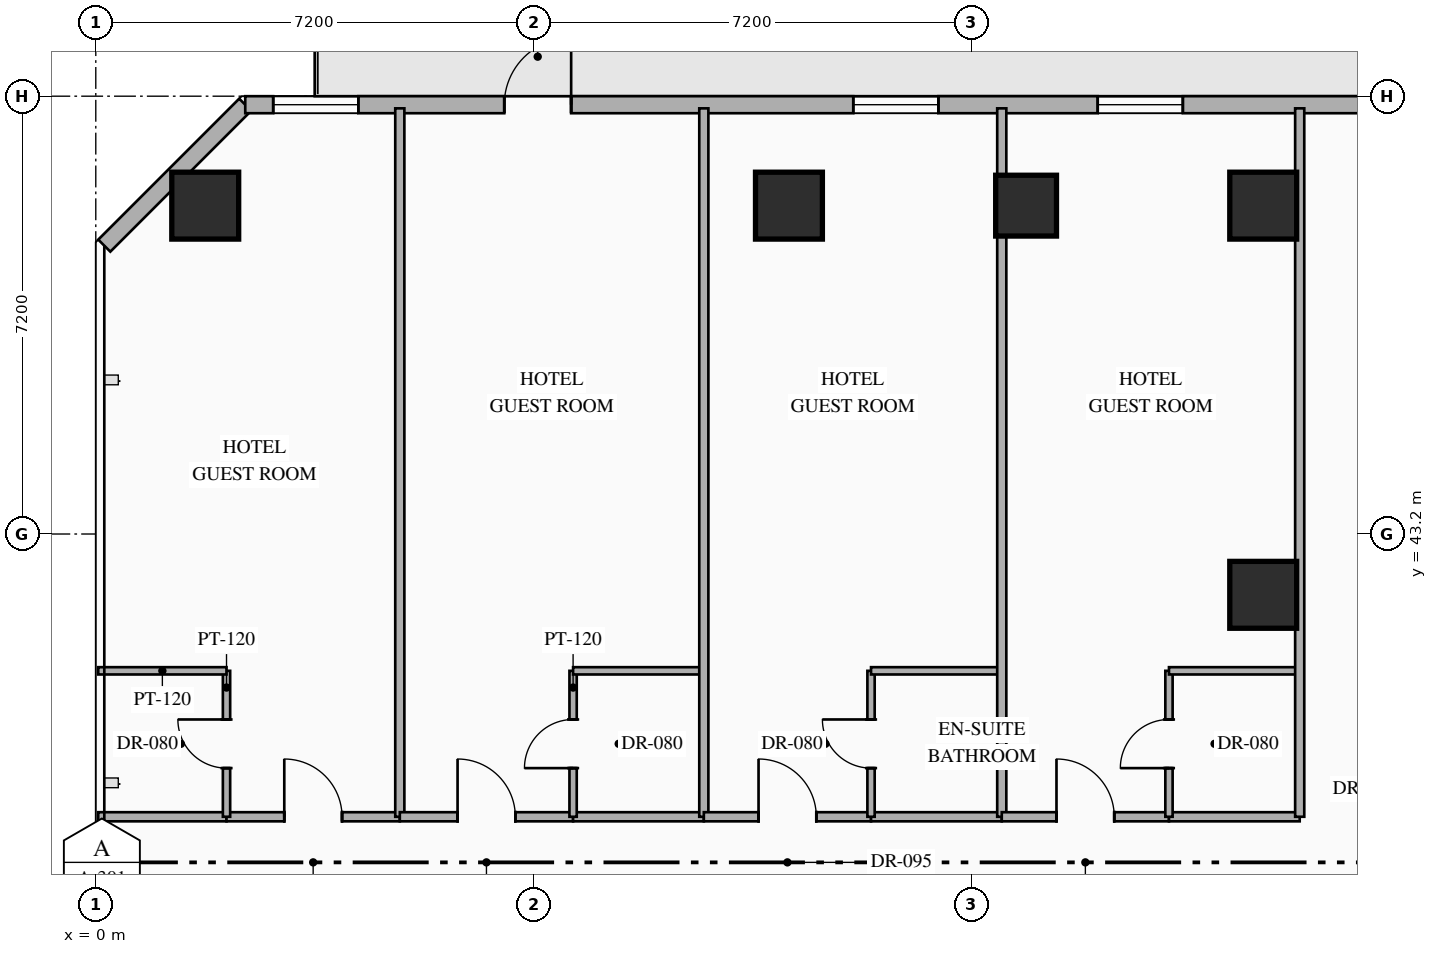
"""IFC4 building model, lengths in metres.
Left out: names, types, materials, properties, quantities, classifications, styles, units other than length and angle.
Written with IfcOpenShell. Run it as: python <this file> out.ifc"""

import sys

from ifc_helpers import new_model, si_unit, direction, frame, frame_2d, origin, origin_2d, place, context, subcontext, project, spatial, rectangle, hollow_rectangle, extrude, element, fill, save


model = new_model("IFC4")
c1 = context("Model", 3, precision=1e-05, world=origin(), true_north=direction((0.0, 1.0)))
c2 = subcontext(c1, "Body", "Model", "MODEL_VIEW")
j1 = project(units=[si_unit("LENGTHUNIT", "METRE"), si_unit("PLANEANGLEUNIT", "RADIAN")], contexts=[c1])
p1 = place(None, origin())
s1 = spatial("IfcSite", under=j1, at=p1, CompositionType="ELEMENT")
p2 = place(p1, origin())
s2 = spatial("IfcBuilding", under=s1, at=p2, CompositionType="ELEMENT")
p3 = place(p2, frame((0.0, 0.0, 60.05)))
s3 = spatial("IfcBuildingStorey", under=s2, at=p3, CompositionType="ELEMENT", Elevation=60.05)
for number, where, z_axis, x_axis in (
    (1, (1.8, 48.6, 0.0), (0.0, 0.0, 1.0), (1.0, 0.0, 0.0)),
    (2, (11.4, 48.6, 0.0), (0.0, 0.0, 1.0), (1.0, 0.0, 0.0)),
    (3, (19.2, 48.6, 0.0), (0.0, 0.0, 1.0), (1.0, 0.0, 0.0)),
    (4, (19.2, 42.2, 0.0), (0.0, 0.0, 1.0), (1.0, 0.0, 0.0)),
):
    element("IfcColumn", number, at=place(p3, frame(where, z_axis=z_axis, x_axis=x_axis)), inside=s3, PredefinedType="COLUMN", context=c2, shape_type="SweptSolid", body=[
        extrude(hollow_rectangle(XDim=1.1, YDim=1.1, WallThickness=0.04, at=origin_2d()), origin(), (0.0, 0.0, 1.0), 3.35),
    ])
p4 = place(p3, frame((15.3, 48.6, 0.0), z_axis=(0.0, 0.0, 1.0), x_axis=(1.0, 0.0, 0.0)))
e5 = element("IfcColumn", 5, at=p4, inside=s3, PredefinedType="COLUMN", context=c2, shape_type="SweptSolid", body=[
    extrude(hollow_rectangle(XDim=1.0, YDim=1.0, WallThickness=0.038, at=origin_2d()), origin(), (0.0, 0.0, 1.0), 3.35),
])
p5 = place(p3, frame((0.14, 47.942, 0.0), z_axis=(0.0, 0.0, 1.0), x_axis=(0.707106781187, 0.707106781187, 0.0)))
e6 = element("IfcWall", 6, at=p5, inside=s3, PredefinedType="STANDARD", context=c2, shape_type="SweptSolid", body=[
    extrude(rectangle(XDim=3.278, YDim=0.28, at=frame_2d((1.639, 0.0))), origin(), (0.0, 0.0, 1.0), 3.13),
])
p6 = place(p3, frame((2.458, 50.26, 0.0), z_axis=(0.0, 0.0, 1.0), x_axis=(1.0, 0.0, 0.0)))
e7 = element("IfcWall", 7, at=p6, inside=s3, PredefinedType="STANDARD", context=c2, shape_type="SweptSolid", body=[
    extrude(rectangle(XDim=40.084, YDim=0.28, at=frame_2d((20.042, 0.0))), origin(), (0.0, 0.0, 1.0), 3.13),
])
p7 = place(p6, frame((4.26, 0.0, 0.0)))
e8 = element("IfcOpeningElement", 8, at=p7, cuts=e7, PredefinedType="OPENING", context=c2, shape_type="SweptSolid", body=[
    extrude(rectangle(XDim=1.1, YDim=2.2, at=frame_2d((0.55, 1.1))), frame((0.0, 0.15, 0.0), z_axis=(0.0, -1.0, 0.0), x_axis=(1.0, 0.0, 0.0)), (0.0, 0.0, 1.0), 0.3),
])
p8 = place(p6, frame((0.46, 0.0, 0.85)))
e9 = element("IfcOpeningElement", 9, at=p8, cuts=e7, PredefinedType="OPENING", context=c2, shape_type="SweptSolid", body=[
    extrude(rectangle(XDim=1.4, YDim=1.8, at=frame_2d((0.7, 0.9))), frame((0.0, 0.15, 0.0), z_axis=(0.0, -1.0, 0.0), x_axis=(1.0, 0.0, 0.0)), (0.0, 0.0, 1.0), 0.3),
])
p9 = place(p6, frame((10.0, 0.0, 0.85)))
e10 = element("IfcOpeningElement", 10, at=p9, cuts=e7, PredefinedType="OPENING", context=c2, shape_type="SweptSolid", body=[
    extrude(rectangle(XDim=1.4, YDim=1.8, at=frame_2d((0.7, 0.9))), frame((0.0, 0.15, 0.0), z_axis=(0.0, -1.0, 0.0), x_axis=(1.0, 0.0, 0.0)), (0.0, 0.0, 1.0), 0.3),
])
p10 = place(p6, frame((14.02, 0.0, 0.85)))
e11 = element("IfcOpeningElement", 11, at=p10, cuts=e7, PredefinedType="OPENING", context=c2, shape_type="SweptSolid", body=[
    extrude(rectangle(XDim=1.4, YDim=1.8, at=frame_2d((0.7, 0.9))), frame((0.0, 0.15, 0.0), z_axis=(0.0, -1.0, 0.0), x_axis=(1.0, 0.0, 0.0)), (0.0, 0.0, 1.0), 0.3),
])
p11 = place(p6, frame((20.789, 0.0, 0.85)))
e12 = element("IfcOpeningElement", 12, at=p11, cuts=e7, PredefinedType="OPENING", context=c2, shape_type="SweptSolid", body=[
    extrude(rectangle(XDim=1.4, YDim=1.8, at=frame_2d((0.7, 0.9))), frame((0.0, 0.15, 0.0), z_axis=(0.0, -1.0, 0.0), x_axis=(1.0, 0.0, 0.0)), (0.0, 0.0, 1.0), 0.3),
])
p12 = place(p6, frame((24.664, 0.0, 0.85)))
e13 = element("IfcOpeningElement", 13, at=p12, cuts=e7, PredefinedType="OPENING", context=c2, shape_type="SweptSolid", body=[
    extrude(rectangle(XDim=1.4, YDim=1.8, at=frame_2d((0.7, 0.9))), frame((0.0, 0.15, 0.0), z_axis=(0.0, -1.0, 0.0), x_axis=(1.0, 0.0, 0.0)), (0.0, 0.0, 1.0), 0.3),
])
p13 = place(p6, frame((26.803, 0.0, 0.85)))
e14 = element("IfcOpeningElement", 14, at=p13, cuts=e7, PredefinedType="OPENING", context=c2, shape_type="SweptSolid", body=[
    extrude(rectangle(XDim=1.4, YDim=1.8, at=frame_2d((0.7, 0.9))), frame((0.0, 0.15, 0.0), z_axis=(0.0, -1.0, 0.0), x_axis=(1.0, 0.0, 0.0)), (0.0, 0.0, 1.0), 0.3),
])
p14 = place(p6, frame((32.703, 0.0, 0.85)))
e15 = element("IfcOpeningElement", 15, at=p14, cuts=e7, PredefinedType="OPENING", context=c2, shape_type="SweptSolid", body=[
    extrude(rectangle(XDim=1.4, YDim=1.8, at=frame_2d((0.7, 0.9))), frame((0.0, 0.15, 0.0), z_axis=(0.0, -1.0, 0.0), x_axis=(1.0, 0.0, 0.0)), (0.0, 0.0, 1.0), 0.3),
])
p15 = place(p6, frame((36.967, 0.0, 0.85)))
e16 = element("IfcOpeningElement", 16, at=p15, cuts=e7, PredefinedType="OPENING", context=c2, shape_type="SweptSolid", body=[
    extrude(rectangle(XDim=1.4, YDim=1.8, at=frame_2d((0.7, 0.9))), frame((0.0, 0.15, 0.0), z_axis=(0.0, -1.0, 0.0), x_axis=(1.0, 0.0, 0.0)), (0.0, 0.0, 1.0), 0.3),
])
p16 = place(p3, frame((0.04, 38.55, 0.0), z_axis=(0.0, 0.0, 1.0), x_axis=(1.0, 0.0, 0.0)))
e17 = element("IfcWall", 17, at=p16, inside=s3, PredefinedType="PARTITIONING", context=c2, shape_type="SweptSolid", body=[
    extrude(rectangle(XDim=2.11, YDim=0.15, at=frame_2d((1.055, 0.0))), origin(), (0.0, 0.0, 1.0), 2.775),
])
p17 = place(p3, frame((2.15, 38.55, 0.0), z_axis=(0.0, 0.0, 1.0), x_axis=(1.0, 0.0, 0.0)))
e18 = element("IfcWall", 18, at=p17, inside=s3, PredefinedType="PARTITIONING", context=c2, shape_type="SweptSolid", body=[
    extrude(rectangle(XDim=2.85, YDim=0.15, at=frame_2d((1.425, 0.0))), origin(), (0.0, 0.0, 1.0), 2.775),
])
p18 = place(p17, frame((0.95, 0.0, 0.0)))
e19 = element("IfcOpeningElement", 19, at=p18, cuts=e18, PredefinedType="OPENING", context=c2, shape_type="SweptSolid", body=[
    extrude(rectangle(XDim=0.95, YDim=2.15, at=frame_2d((0.475, 1.075))), frame((0.0, 0.085, 0.0), z_axis=(0.0, -1.0, 0.0), x_axis=(1.0, 0.0, 0.0)), (0.0, 0.0, 1.0), 0.17),
])
p19 = place(p3, frame((2.15, 38.55, 0.0), z_axis=(0.0, 0.0, 1.0), x_axis=(0.0, 1.0, 0.0)))
e20 = element("IfcWall", 20, at=p19, inside=s3, PredefinedType="PARTITIONING", context=c2, shape_type="SweptSolid", body=[
    extrude(rectangle(XDim=2.4, YDim=0.12, at=frame_2d((1.2, 0.0))), origin(), (0.0, 0.0, 1.0), 3.13),
])
p20 = place(p19, frame((0.8, 0.0, 0.0)))
e21 = element("IfcOpeningElement", 21, at=p20, cuts=e20, PredefinedType="OPENING", context=c2, shape_type="SweptSolid", body=[
    extrude(rectangle(XDim=0.8, YDim=2.06, at=frame_2d((0.4, 1.03))), frame((0.0, 0.07, 0.0), z_axis=(0.0, -1.0, 0.0), x_axis=(1.0, 0.0, 0.0)), (0.0, 0.0, 1.0), 0.14),
])
p21 = place(p3, frame((0.04, 40.95, 0.0), z_axis=(0.0, 0.0, 1.0), x_axis=(1.0, 0.0, 0.0)))
e22 = element("IfcWall", 22, at=p21, inside=s3, PredefinedType="PARTITIONING", context=c2, shape_type="SweptSolid", body=[
    extrude(rectangle(XDim=2.11, YDim=0.12, at=frame_2d((1.055, 0.0))), origin(), (0.0, 0.0, 1.0), 2.775),
])
p22 = place(p3, frame((5.0, 38.55, 0.0), z_axis=(0.0, 0.0, 1.0), x_axis=(0.0, 1.0, 0.0)))
e23 = element("IfcWall", 23, at=p22, inside=s3, PredefinedType="PARTITIONING", context=c2, shape_type="SweptSolid", body=[
    extrude(rectangle(XDim=11.65, YDim=0.15, at=frame_2d((5.825, 0.0))), origin(), (0.0, 0.0, 1.0), 3.13),
])
p23 = place(p3, frame((5.0, 38.55, 0.0), z_axis=(0.0, 0.0, 1.0), x_axis=(1.0, 0.0, 0.0)))
e24 = element("IfcWall", 24, at=p23, inside=s3, PredefinedType="PARTITIONING", context=c2, shape_type="SweptSolid", body=[
    extrude(rectangle(XDim=2.85, YDim=0.15, at=frame_2d((1.425, 0.0))), origin(), (0.0, 0.0, 1.0), 2.775),
])
p24 = place(p23, frame((0.95, 0.0, 0.0)))
e25 = element("IfcOpeningElement", 25, at=p24, cuts=e24, PredefinedType="OPENING", context=c2, shape_type="SweptSolid", body=[
    extrude(rectangle(XDim=0.95, YDim=2.15, at=frame_2d((0.475, 1.075))), frame((0.0, 0.085, 0.0), z_axis=(0.0, -1.0, 0.0), x_axis=(1.0, 0.0, 0.0)), (0.0, 0.0, 1.0), 0.17),
])
p25 = place(p3, frame((7.85, 38.55, 0.0), z_axis=(0.0, 0.0, 1.0), x_axis=(1.0, 0.0, 0.0)))
e26 = element("IfcWall", 26, at=p25, inside=s3, PredefinedType="PARTITIONING", context=c2, shape_type="SweptSolid", body=[
    extrude(rectangle(XDim=2.15, YDim=0.15, at=frame_2d((1.075, 0.0))), origin(), (0.0, 0.0, 1.0), 2.775),
])
p26 = place(p3, frame((7.85, 38.55, 0.0), z_axis=(0.0, 0.0, 1.0), x_axis=(0.0, 1.0, 0.0)))
e27 = element("IfcWall", 27, at=p26, inside=s3, PredefinedType="PARTITIONING", context=c2, shape_type="SweptSolid", body=[
    extrude(rectangle(XDim=2.4, YDim=0.12, at=frame_2d((1.2, 0.0))), origin(), (0.0, 0.0, 1.0), 3.13),
])
p27 = place(p26, frame((0.8, 0.0, 0.0)))
e28 = element("IfcOpeningElement", 28, at=p27, cuts=e27, PredefinedType="OPENING", context=c2, shape_type="SweptSolid", body=[
    extrude(rectangle(XDim=0.8, YDim=2.06, at=frame_2d((0.4, 1.03))), frame((0.0, 0.07, 0.0), z_axis=(0.0, -1.0, 0.0), x_axis=(1.0, 0.0, 0.0)), (0.0, 0.0, 1.0), 0.14),
])
p28 = place(p3, frame((7.85, 40.95, 0.0), z_axis=(0.0, 0.0, 1.0), x_axis=(1.0, 0.0, 0.0)))
e29 = element("IfcWall", 29, at=p28, inside=s3, PredefinedType="PARTITIONING", context=c2, shape_type="SweptSolid", body=[
    extrude(rectangle(XDim=2.15, YDim=0.12, at=frame_2d((1.075, 0.0))), origin(), (0.0, 0.0, 1.0), 2.775),
])
p29 = place(p3, frame((10.0, 38.55, 0.0), z_axis=(0.0, 0.0, 1.0), x_axis=(0.0, 1.0, 0.0)))
e30 = element("IfcWall", 30, at=p29, inside=s3, PredefinedType="PARTITIONING", context=c2, shape_type="SweptSolid", body=[
    extrude(rectangle(XDim=11.65, YDim=0.15, at=frame_2d((5.825, 0.0))), origin(), (0.0, 0.0, 1.0), 3.13),
])
p30 = place(p3, frame((10.0, 38.55, 0.0), z_axis=(0.0, 0.0, 1.0), x_axis=(1.0, 0.0, 0.0)))
e31 = element("IfcWall", 31, at=p30, inside=s3, PredefinedType="PARTITIONING", context=c2, shape_type="SweptSolid", body=[
    extrude(rectangle(XDim=2.75, YDim=0.15, at=frame_2d((1.375, 0.0))), origin(), (0.0, 0.0, 1.0), 2.775),
])
p31 = place(p30, frame((0.9, 0.0, 0.0)))
e32 = element("IfcOpeningElement", 32, at=p31, cuts=e31, PredefinedType="OPENING", context=c2, shape_type="SweptSolid", body=[
    extrude(rectangle(XDim=0.95, YDim=2.15, at=frame_2d((0.475, 1.075))), frame((0.0, 0.085, 0.0), z_axis=(0.0, -1.0, 0.0), x_axis=(1.0, 0.0, 0.0)), (0.0, 0.0, 1.0), 0.17),
])
p32 = place(p3, frame((12.75, 38.55, 0.0), z_axis=(0.0, 0.0, 1.0), x_axis=(1.0, 0.0, 0.0)))
e33 = element("IfcWall", 33, at=p32, inside=s3, PredefinedType="PARTITIONING", context=c2, shape_type="SweptSolid", body=[
    extrude(rectangle(XDim=2.15, YDim=0.15, at=frame_2d((1.075, 0.0))), origin(), (0.0, 0.0, 1.0), 2.775),
])
p33 = place(p3, frame((12.75, 38.55, 0.0), z_axis=(0.0, 0.0, 1.0), x_axis=(0.0, 1.0, 0.0)))
e34 = element("IfcWall", 34, at=p33, inside=s3, PredefinedType="PARTITIONING", context=c2, shape_type="SweptSolid", body=[
    extrude(rectangle(XDim=2.4, YDim=0.12, at=frame_2d((1.2, 0.0))), origin(), (0.0, 0.0, 1.0), 3.13),
])
p34 = place(p33, frame((0.8, 0.0, 0.0)))
e35 = element("IfcOpeningElement", 35, at=p34, cuts=e34, PredefinedType="OPENING", context=c2, shape_type="SweptSolid", body=[
    extrude(rectangle(XDim=0.8, YDim=2.06, at=frame_2d((0.4, 1.03))), frame((0.0, 0.07, 0.0), z_axis=(0.0, -1.0, 0.0), x_axis=(1.0, 0.0, 0.0)), (0.0, 0.0, 1.0), 0.14),
])
p35 = place(p3, frame((12.75, 40.95, 0.0), z_axis=(0.0, 0.0, 1.0), x_axis=(1.0, 0.0, 0.0)))
e36 = element("IfcWall", 36, at=p35, inside=s3, PredefinedType="PARTITIONING", context=c2, shape_type="SweptSolid", body=[
    extrude(rectangle(XDim=2.15, YDim=0.12, at=frame_2d((1.075, 0.0))), origin(), (0.0, 0.0, 1.0), 2.775),
])
p36 = place(p3, frame((14.9, 38.55, 0.0), z_axis=(0.0, 0.0, 1.0), x_axis=(0.0, 1.0, 0.0)))
e37 = element("IfcWall", 37, at=p36, inside=s3, PredefinedType="PARTITIONING", context=c2, shape_type="SweptSolid", body=[
    extrude(rectangle(XDim=11.65, YDim=0.15, at=frame_2d((5.825, 0.0))), origin(), (0.0, 0.0, 1.0), 3.13),
])
p37 = place(p3, frame((14.9, 38.55, 0.0), z_axis=(0.0, 0.0, 1.0), x_axis=(1.0, 0.0, 0.0)))
e38 = element("IfcWall", 38, at=p37, inside=s3, PredefinedType="PARTITIONING", context=c2, shape_type="SweptSolid", body=[
    extrude(rectangle(XDim=2.75, YDim=0.15, at=frame_2d((1.375, 0.0))), origin(), (0.0, 0.0, 1.0), 2.775),
])
p38 = place(p37, frame((0.9, 0.0, 0.0)))
e39 = element("IfcOpeningElement", 39, at=p38, cuts=e38, PredefinedType="OPENING", context=c2, shape_type="SweptSolid", body=[
    extrude(rectangle(XDim=0.95, YDim=2.15, at=frame_2d((0.475, 1.075))), frame((0.0, 0.085, 0.0), z_axis=(0.0, -1.0, 0.0), x_axis=(1.0, 0.0, 0.0)), (0.0, 0.0, 1.0), 0.17),
])
p39 = place(p3, frame((17.65, 38.55, 0.0), z_axis=(0.0, 0.0, 1.0), x_axis=(1.0, 0.0, 0.0)))
e40 = element("IfcWall", 40, at=p39, inside=s3, PredefinedType="PARTITIONING", context=c2, shape_type="SweptSolid", body=[
    extrude(rectangle(XDim=2.15, YDim=0.15, at=frame_2d((1.075, 0.0))), origin(), (0.0, 0.0, 1.0), 2.775),
])
p40 = place(p3, frame((17.65, 38.55, 0.0), z_axis=(0.0, 0.0, 1.0), x_axis=(0.0, 1.0, 0.0)))
e41 = element("IfcWall", 41, at=p40, inside=s3, PredefinedType="PARTITIONING", context=c2, shape_type="SweptSolid", body=[
    extrude(rectangle(XDim=2.4, YDim=0.12, at=frame_2d((1.2, 0.0))), origin(), (0.0, 0.0, 1.0), 3.13),
])
p41 = place(p40, frame((0.8, 0.0, 0.0)))
e42 = element("IfcOpeningElement", 42, at=p41, cuts=e41, PredefinedType="OPENING", context=c2, shape_type="SweptSolid", body=[
    extrude(rectangle(XDim=0.8, YDim=2.06, at=frame_2d((0.4, 1.03))), frame((0.0, 0.07, 0.0), z_axis=(0.0, -1.0, 0.0), x_axis=(1.0, 0.0, 0.0)), (0.0, 0.0, 1.0), 0.14),
])
p42 = place(p3, frame((17.65, 40.95, 0.0), z_axis=(0.0, 0.0, 1.0), x_axis=(1.0, 0.0, 0.0)))
e43 = element("IfcWall", 43, at=p42, inside=s3, PredefinedType="PARTITIONING", context=c2, shape_type="SweptSolid", body=[
    extrude(rectangle(XDim=2.15, YDim=0.12, at=frame_2d((1.075, 0.0))), origin(), (0.0, 0.0, 1.0), 2.775),
])
p43 = place(p3, frame((19.8, 38.55, 0.0), z_axis=(0.0, 0.0, 1.0), x_axis=(0.0, 1.0, 0.0)))
e44 = element("IfcWall", 44, at=p43, inside=s3, PredefinedType="PARTITIONING", context=c2, shape_type="SweptSolid", body=[
    extrude(rectangle(XDim=11.65, YDim=0.15, at=frame_2d((5.825, 0.0))), origin(), (0.0, 0.0, 1.0), 3.13),
])
p44 = place(p7, origin())
e45 = element("IfcDoor", 45, at=p44, inside=s3, OperationType="SINGLE_SWING_RIGHT", PredefinedType="DOOR", context=c2, shape_type="SweptSolid", body=[
    extrude(rectangle(XDim=1.1, YDim=2.2, at=frame_2d((0.55, 1.1))), frame((0.0, 0.025, 0.0), z_axis=(0.0, -1.0, 0.0), x_axis=(1.0, 0.0, 0.0)), (0.0, 0.0, 1.0), 0.05),
])
fill(e8, e45)
p45 = place(p8, origin())
e46 = element("IfcWindow", 46, at=p45, inside=s3, PartitioningType="SINGLE_PANEL", PredefinedType="WINDOW", context=c2, shape_type="SweptSolid", body=[
    extrude(rectangle(XDim=1.4, YDim=1.8, at=frame_2d((0.7, 0.9))), frame((0.0, 0.03, 0.0), z_axis=(0.0, -1.0, 0.0), x_axis=(1.0, 0.0, 0.0)), (0.0, 0.0, 1.0), 0.06),
])
fill(e9, e46)
p46 = place(p9, origin())
e47 = element("IfcWindow", 47, at=p46, inside=s3, PartitioningType="SINGLE_PANEL", PredefinedType="WINDOW", context=c2, shape_type="SweptSolid", body=[
    extrude(rectangle(XDim=1.4, YDim=1.8, at=frame_2d((0.7, 0.9))), frame((0.0, 0.03, 0.0), z_axis=(0.0, -1.0, 0.0), x_axis=(1.0, 0.0, 0.0)), (0.0, 0.0, 1.0), 0.06),
])
fill(e10, e47)
p47 = place(p10, origin())
e48 = element("IfcWindow", 48, at=p47, inside=s3, PartitioningType="SINGLE_PANEL", PredefinedType="WINDOW", context=c2, shape_type="SweptSolid", body=[
    extrude(rectangle(XDim=1.4, YDim=1.8, at=frame_2d((0.7, 0.9))), frame((0.0, 0.03, 0.0), z_axis=(0.0, -1.0, 0.0), x_axis=(1.0, 0.0, 0.0)), (0.0, 0.0, 1.0), 0.06),
])
fill(e11, e48)
p48 = place(p18, origin())
e49 = element("IfcDoor", 49, at=p48, inside=s3, OperationType="SINGLE_SWING_LEFT", PredefinedType="DOOR", context=c2, shape_type="SweptSolid", body=[
    extrude(rectangle(XDim=0.95, YDim=2.15, at=frame_2d((0.475, 1.075))), frame((0.0, 0.025, 0.0), z_axis=(0.0, -1.0, 0.0), x_axis=(1.0, 0.0, 0.0)), (0.0, 0.0, 1.0), 0.05),
])
fill(e19, e49)
p49 = place(p20, origin())
e50 = element("IfcDoor", 50, at=p49, inside=s3, OperationType="SINGLE_SWING_RIGHT", PredefinedType="DOOR", context=c2, shape_type="SweptSolid", body=[
    extrude(rectangle(XDim=0.8, YDim=2.06, at=frame_2d((0.4, 1.03))), frame((0.0, 0.025, 0.0), z_axis=(0.0, -1.0, 0.0), x_axis=(1.0, 0.0, 0.0)), (0.0, 0.0, 1.0), 0.05),
])
fill(e21, e50)
p50 = place(p24, origin())
e51 = element("IfcDoor", 51, at=p50, inside=s3, OperationType="SINGLE_SWING_LEFT", PredefinedType="DOOR", context=c2, shape_type="SweptSolid", body=[
    extrude(rectangle(XDim=0.95, YDim=2.15, at=frame_2d((0.475, 1.075))), frame((0.0, 0.025, 0.0), z_axis=(0.0, -1.0, 0.0), x_axis=(1.0, 0.0, 0.0)), (0.0, 0.0, 1.0), 0.05),
])
fill(e25, e51)
p51 = place(p27, origin())
e52 = element("IfcDoor", 52, at=p51, inside=s3, OperationType="SINGLE_SWING_LEFT", PredefinedType="DOOR", context=c2, shape_type="SweptSolid", body=[
    extrude(rectangle(XDim=0.8, YDim=2.06, at=frame_2d((0.4, 1.03))), frame((0.0, 0.025, 0.0), z_axis=(0.0, -1.0, 0.0), x_axis=(1.0, 0.0, 0.0)), (0.0, 0.0, 1.0), 0.05),
])
fill(e28, e52)
p52 = place(p31, origin())
e53 = element("IfcDoor", 53, at=p52, inside=s3, OperationType="SINGLE_SWING_LEFT", PredefinedType="DOOR", context=c2, shape_type="SweptSolid", body=[
    extrude(rectangle(XDim=0.95, YDim=2.15, at=frame_2d((0.475, 1.075))), frame((0.0, 0.025, 0.0), z_axis=(0.0, -1.0, 0.0), x_axis=(1.0, 0.0, 0.0)), (0.0, 0.0, 1.0), 0.05),
])
fill(e32, e53)
p53 = place(p34, origin())
e54 = element("IfcDoor", 54, at=p53, inside=s3, OperationType="SINGLE_SWING_RIGHT", PredefinedType="DOOR", context=c2, shape_type="SweptSolid", body=[
    extrude(rectangle(XDim=0.8, YDim=2.06, at=frame_2d((0.4, 1.03))), frame((0.0, 0.025, 0.0), z_axis=(0.0, -1.0, 0.0), x_axis=(1.0, 0.0, 0.0)), (0.0, 0.0, 1.0), 0.05),
])
fill(e35, e54)
p54 = place(p38, origin())
e55 = element("IfcDoor", 55, at=p54, inside=s3, OperationType="SINGLE_SWING_LEFT", PredefinedType="DOOR", context=c2, shape_type="SweptSolid", body=[
    extrude(rectangle(XDim=0.95, YDim=2.15, at=frame_2d((0.475, 1.075))), frame((0.0, 0.025, 0.0), z_axis=(0.0, -1.0, 0.0), x_axis=(1.0, 0.0, 0.0)), (0.0, 0.0, 1.0), 0.05),
])
fill(e39, e55)
p55 = place(p41, origin())
e56 = element("IfcDoor", 56, at=p55, inside=s3, OperationType="SINGLE_SWING_LEFT", PredefinedType="DOOR", context=c2, shape_type="SweptSolid", body=[
    extrude(rectangle(XDim=0.8, YDim=2.06, at=frame_2d((0.4, 1.03))), frame((0.0, 0.025, 0.0), z_axis=(0.0, -1.0, 0.0), x_axis=(1.0, 0.0, 0.0)), (0.0, 0.0, 1.0), 0.05),
])
fill(e42, e56)
save(model, sys.argv[1])
